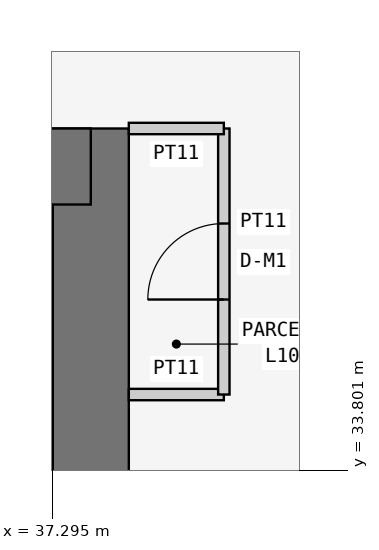
"""IFC4 building model, lengths in metres.
Left out: names, types, materials, properties, quantities, classifications, styles, units other than length and angle.
Written with IfcOpenShell. Run it as: python <this file> out.ifc"""

import sys

from ifc_helpers import new_model, si_unit, direction, frame, frame_2d, origin, place, context, subcontext, project, spatial, rectangle, extrude, element, fill, save


model = new_model("IFC4")
c1 = context("Model", 3, precision=1e-05, world=origin(), true_north=direction((0.0, 1.0)))
c2 = subcontext(c1, "Body", "Model", "MODEL_VIEW")
j1 = project(units=[si_unit("LENGTHUNIT", "METRE"), si_unit("PLANEANGLEUNIT", "RADIAN")], contexts=[c1])
p1 = place(None, origin())
s1 = spatial("IfcSite", under=j1, at=p1, CompositionType="ELEMENT")
p2 = place(p1, origin())
s2 = spatial("IfcBuilding", under=s1, at=p2, CompositionType="ELEMENT")
p3 = place(p2, frame((0.0, 0.0, 45.3)))
s3 = spatial("IfcBuildingStorey", under=s2, at=p3, CompositionType="ELEMENT", Elevation=45.3)
p4 = place(p3, frame((37.8, 21.0, 0.0), z_axis=(0.0, 0.0, 1.0), x_axis=(0.0, 1.0, 0.0)))
e1 = element("IfcWall", 1, at=p4, inside=s3, PredefinedType="SHEAR", context=c2, shape_type="SweptSolid", body=[
    extrude(rectangle(XDim=17.3, YDim=1.0, at=frame_2d((8.65, 0.0))), origin(), (0.0, 0.0, 1.0), 3.6),
])
p5 = place(p4, frame((5.2, 0.0, 0.0)))
e2 = element("IfcOpeningElement", 2, at=p5, cuts=e1, PredefinedType="OPENING", context=c2, shape_type="SweptSolid", body=[
    extrude(rectangle(XDim=1.2, YDim=2.1, at=frame_2d((0.6, 1.05))), frame((0.0, 0.51, 0.0), z_axis=(0.0, -1.0, 0.0), x_axis=(1.0, 0.0, 0.0)), (0.0, 0.0, 1.0), 1.02),
])
p6 = place(p3, frame((37.8, 37.8, 0.0), z_axis=(0.0, 0.0, 1.0), x_axis=(-1.0, 0.0, 0.0)))
e3 = element("IfcWall", 3, at=p6, inside=s3, PredefinedType="SHEAR", context=c2, shape_type="SweptSolid", body=[
    extrude(rectangle(XDim=17.3, YDim=1.0, at=frame_2d((8.65, 0.0))), origin(), (0.0, 0.0, 1.0), 3.6),
])
p7 = place(p3, frame((38.3, 34.8, 0.0), z_axis=(0.0, 0.0, 1.0), x_axis=(1.0, 0.0, 0.0)))
e4 = element("IfcWall", 4, at=p7, inside=s3, PredefinedType="PARTITIONING", context=c2, shape_type="SweptSolid", body=[
    extrude(rectangle(XDim=1.25, YDim=0.15, at=frame_2d((0.625, 0.0))), origin(), (0.0, 0.0, 1.0), 3.45),
])
p8 = place(p3, frame((39.55, 34.8, 0.0), z_axis=(0.0, 0.0, 1.0), x_axis=(0.0, 1.0, 0.0)))
e5 = element("IfcWall", 5, at=p8, inside=s3, PredefinedType="PARTITIONING", context=c2, shape_type="SweptSolid", body=[
    extrude(rectangle(XDim=3.5, YDim=0.15, at=frame_2d((1.75, 0.0))), origin(), (0.0, 0.0, 1.0), 3.45),
])
p9 = place(p8, frame((1.25, 0.0, 0.0)))
e6 = element("IfcOpeningElement", 6, at=p9, cuts=e5, PredefinedType="OPENING", context=c2, shape_type="SweptSolid", body=[
    extrude(rectangle(XDim=1.0, YDim=2.1, at=frame_2d((0.5, 1.05))), frame((0.0, 0.085, 0.0), z_axis=(0.0, -1.0, 0.0), x_axis=(1.0, 0.0, 0.0)), (0.0, 0.0, 1.0), 0.17),
])
p10 = place(p3, frame((39.55, 38.3, 0.0), z_axis=(0.0, 0.0, 1.0), x_axis=(-1.0, 0.0, 0.0)))
e7 = element("IfcWall", 7, at=p10, inside=s3, PredefinedType="PARTITIONING", context=c2, shape_type="SweptSolid", body=[
    extrude(rectangle(XDim=1.25, YDim=0.15, at=frame_2d((0.625, 0.0))), origin(), (0.0, 0.0, 1.0), 3.45),
])
p11 = place(p9, origin())
e8 = element("IfcDoor", 8, at=p11, inside=s3, OperationType="SINGLE_SWING_LEFT", PredefinedType="DOOR", context=c2, shape_type="SweptSolid", body=[
    extrude(rectangle(XDim=1.0, YDim=2.1, at=frame_2d((0.5, 1.05))), frame((0.0, 0.025, 0.0), z_axis=(0.0, -1.0, 0.0), x_axis=(1.0, 0.0, 0.0)), (0.0, 0.0, 1.0), 0.05),
])
fill(e6, e8)
save(model, sys.argv[1])
